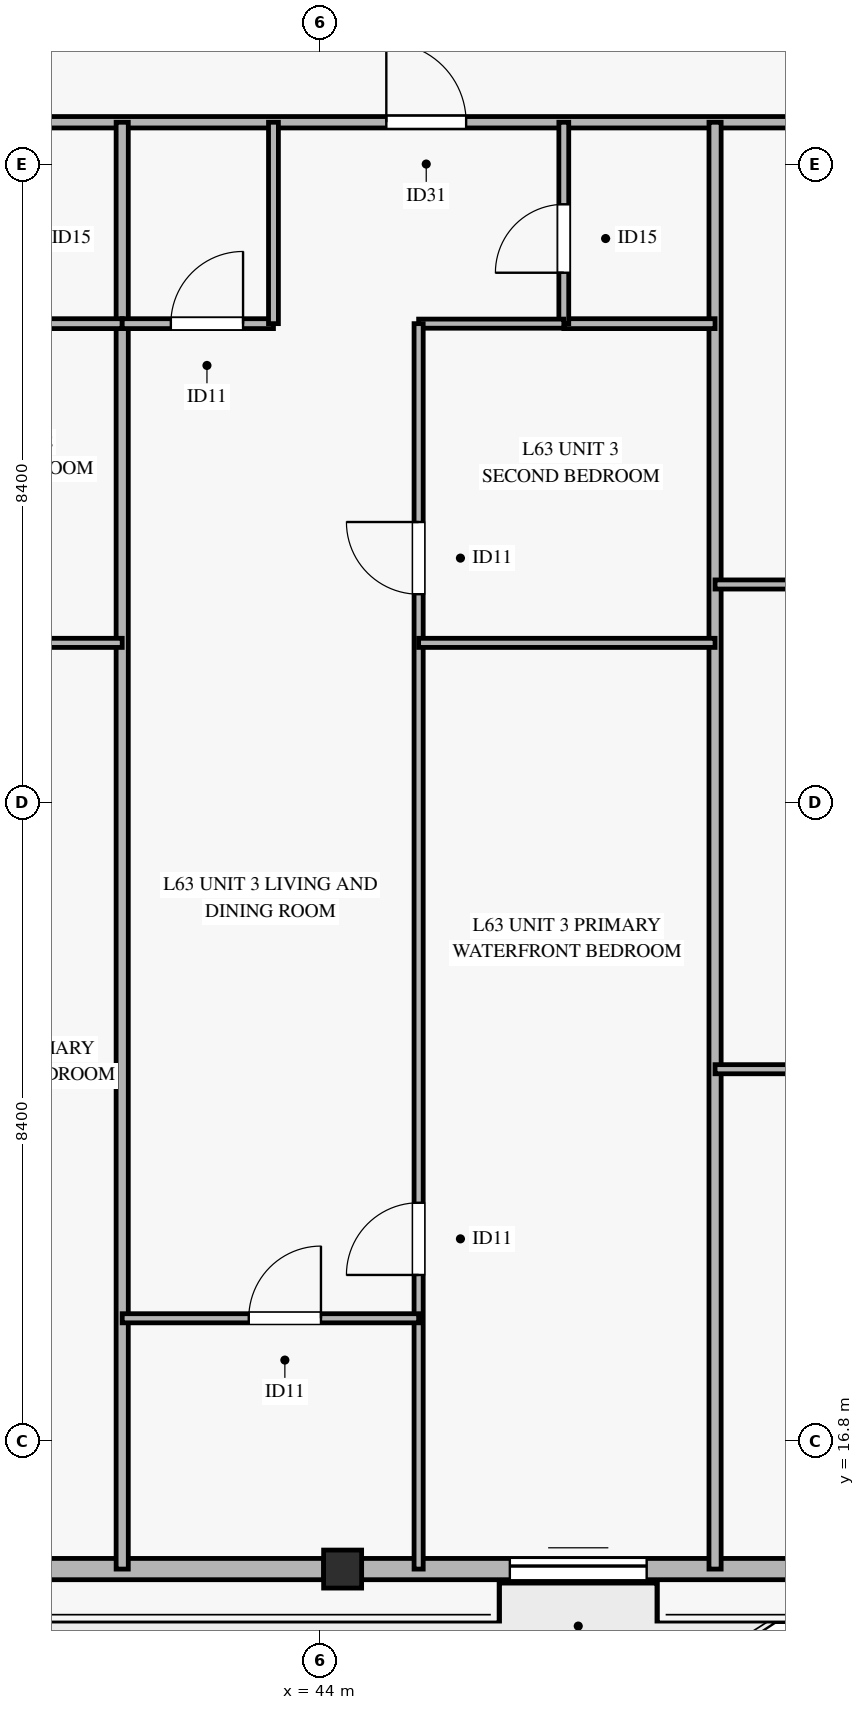
"""IFC4 building model, lengths in metres.
Left out: names, types, materials, properties, quantities, classifications, styles, units other than length and angle.
Written with IfcOpenShell. Run it as: python <this file> out.ifc"""

import sys

from ifc_helpers import new_model, si_unit, direction, frame, frame_2d, origin, origin_2d, place, context, subcontext, project, spatial, rectangle, hollow_rectangle, extrude, source, transform, mapped, element, fill, save


model = new_model("IFC4")
c1 = context("Model", 3, precision=1e-05, world=origin(), true_north=direction((0.0, 1.0)))
c2 = subcontext(c1, "Body", "Model", "MODEL_VIEW")
j1 = project(units=[si_unit("LENGTHUNIT", "METRE"), si_unit("PLANEANGLEUNIT", "RADIAN")], contexts=[c1])
p1 = place(None, origin())
s1 = spatial("IfcSite", under=j1, at=p1, CompositionType="ELEMENT")
p2 = place(p1, origin())
s2 = spatial("IfcBuilding", under=s1, at=p2, CompositionType="ELEMENT")
p3 = place(p2, frame((0.0, 0.0, 248.5)))
s3 = spatial("IfcBuildingStorey", under=s2, at=p3, CompositionType="ELEMENT", Elevation=248.5)
m1 = source(origin(), c2, "Body", "SweptSolid", [
    extrude(hollow_rectangle(XDim=0.5, YDim=0.5, WallThickness=0.024, at=origin_2d()), origin(), (0.0, 0.0, 1.0), 3.185),
])
p4 = place(p3, frame((44.3, 15.113, 0.0), z_axis=(0.0, 0.0, 1.0), x_axis=(1.0, 0.0, 0.0)))
e1 = element("IfcColumn", 1, at=p4, inside=s3, PredefinedType="COLUMN", context=c2, shape_type="MappedRepresentation", body=[
    mapped(m1, transform((0.0, 0.0, 0.0), x_axis=(1.0, 0.0, 0.0), y_axis=(0.0, 1.0, 0.0), z_axis=(0.0, 0.0, 1.0), scale=1.0)),
])
p5 = place(p3, frame((37.8, 15.113, 0.0), z_axis=(0.0, 0.0, 1.0), x_axis=(1.0, 0.0, 0.0)))
e2 = element("IfcWall", 2, at=p5, inside=s3, PredefinedType="SOLIDWALL", context=c2, shape_type="SweptSolid", body=[
    extrude(rectangle(XDim=6.25, YDim=0.28, at=frame_2d((3.125, 0.0))), origin(), (0.0, 0.0, 1.0), 2.815),
])
p6 = place(p3, frame((44.55, 15.113, 0.0), z_axis=(0.0, 0.0, 1.0), x_axis=(1.0, 0.0, 0.0)))
e3 = element("IfcWall", 3, at=p6, inside=s3, PredefinedType="SOLIDWALL", context=c2, shape_type="SweptSolid", body=[
    extrude(rectangle(XDim=5.75, YDim=0.28, at=frame_2d((2.875, 0.0))), origin(), (0.0, 0.0, 1.0), 2.815),
])
p7 = place(p6, frame((1.95, 0.0, 0.0)))
e4 = element("IfcOpeningElement", 4, at=p7, cuts=e3, PredefinedType="OPENING", context=c2, shape_type="SweptSolid", body=[
    extrude(rectangle(XDim=1.8, YDim=2.25, at=frame_2d((0.9, 1.125))), frame((0.0, 0.15, 0.0), z_axis=(0.0, -1.0, 0.0), x_axis=(1.0, 0.0, 0.0)), (0.0, 0.0, 1.0), 0.3),
])
p8 = place(p3, frame((8.364, 34.15, 0.0), z_axis=(0.0, 0.0, 1.0), x_axis=(1.0, 0.0, 0.0)))
e5 = element("IfcWall", 5, at=p8, inside=s3, PredefinedType="PARTITIONING", context=c2, shape_type="SweptSolid", body=[
    extrude(rectangle(XDim=53.673, YDim=0.15, at=frame_2d((26.836, 0.0))), origin(), (0.0, 0.0, 1.0), 2.47),
])
p9 = place(p8, frame((5.627, 0.0, 0.0)))
e6 = element("IfcOpeningElement", 6, at=p9, cuts=e5, PredefinedType="OPENING", context=c2, shape_type="SweptSolid", body=[
    extrude(rectangle(XDim=1.05, YDim=2.15, at=frame_2d((0.525, 1.075))), frame((0.0, 0.085, 0.0), z_axis=(0.0, -1.0, 0.0), x_axis=(1.0, 0.0, 0.0)), (0.0, 0.0, 1.0), 0.17),
])
p10 = place(p8, frame((16.561, 0.0, 0.0)))
e7 = element("IfcOpeningElement", 7, at=p10, cuts=e5, PredefinedType="OPENING", context=c2, shape_type="SweptSolid", body=[
    extrude(rectangle(XDim=1.05, YDim=2.15, at=frame_2d((0.525, 1.075))), frame((0.0, 0.085, 0.0), z_axis=(0.0, -1.0, 0.0), x_axis=(1.0, 0.0, 0.0)), (0.0, 0.0, 1.0), 0.17),
])
p11 = place(p8, frame((23.011, 0.0, 0.0)))
e8 = element("IfcOpeningElement", 8, at=p11, cuts=e5, PredefinedType="OPENING", context=c2, shape_type="SweptSolid", body=[
    extrude(rectangle(XDim=1.05, YDim=2.15, at=frame_2d((0.525, 1.075))), frame((0.0, 0.085, 0.0), z_axis=(0.0, -1.0, 0.0), x_axis=(1.0, 0.0, 0.0)), (0.0, 0.0, 1.0), 0.17),
])
p12 = place(p8, frame((29.411, 0.0, 0.0)))
e9 = element("IfcOpeningElement", 9, at=p12, cuts=e5, PredefinedType="OPENING", context=c2, shape_type="SweptSolid", body=[
    extrude(rectangle(XDim=1.05, YDim=2.15, at=frame_2d((0.525, 1.075))), frame((0.0, 0.085, 0.0), z_axis=(0.0, -1.0, 0.0), x_axis=(1.0, 0.0, 0.0)), (0.0, 0.0, 1.0), 0.17),
])
p13 = place(p8, frame((36.511, 0.0, 0.0)))
e10 = element("IfcOpeningElement", 10, at=p13, cuts=e5, PredefinedType="OPENING", context=c2, shape_type="SweptSolid", body=[
    extrude(rectangle(XDim=1.05, YDim=2.15, at=frame_2d((0.525, 1.075))), frame((0.0, 0.085, 0.0), z_axis=(0.0, -1.0, 0.0), x_axis=(1.0, 0.0, 0.0)), (0.0, 0.0, 1.0), 0.17),
])
p14 = place(p8, frame((45.807, 0.0, 0.0)))
e11 = element("IfcOpeningElement", 11, at=p14, cuts=e5, PredefinedType="OPENING", context=c2, shape_type="SweptSolid", body=[
    extrude(rectangle(XDim=1.05, YDim=2.15, at=frame_2d((0.525, 1.075))), frame((0.0, 0.085, 0.0), z_axis=(0.0, -1.0, 0.0), x_axis=(1.0, 0.0, 0.0)), (0.0, 0.0, 1.0), 0.17),
])
for number, where, z_axis, x_axis in (
    (12, (41.4, 15.113, 0.0), (0.0, 0.0, 1.0), (0.0, 1.0, 0.0)),
    (13, (49.2, 15.113, 0.0), (0.0, 0.0, 1.0), (0.0, 1.0, 0.0)),
):
    element("IfcWall", number, at=place(p3, frame(where, z_axis=z_axis, x_axis=x_axis)), inside=s3, PredefinedType="PARTITIONING", context=c2, shape_type="SweptSolid", body=[
        extrude(rectangle(XDim=19.037, YDim=0.16, at=frame_2d((9.519, 0.0))), origin(), (0.0, 0.0, 1.0), 2.77),
    ])
p15 = place(p3, frame((39.76, 31.5, 0.0), z_axis=(0.0, 0.0, 1.0), x_axis=(1.0, 0.0, 0.0)))
e14 = element("IfcWall", 14, at=p15, inside=s3, PredefinedType="PARTITIONING", context=c2, shape_type="SweptSolid", body=[
    extrude(rectangle(XDim=1.64, YDim=0.13, at=frame_2d((0.82, 0.0))), origin(), (0.0, 0.0, 1.0), 3.185),
])
p16 = place(p3, frame((38.2, 27.3, 0.0), z_axis=(0.0, 0.0, 1.0), x_axis=(1.0, 0.0, 0.0)))
e15 = element("IfcWall", 15, at=p16, inside=s3, PredefinedType="PARTITIONING", context=c2, shape_type="SweptSolid", body=[
    extrude(rectangle(XDim=3.2, YDim=0.12, at=frame_2d((1.6, 0.0))), origin(), (0.0, 0.0, 1.0), 3.185),
])
p17 = place(p3, frame((41.4, 31.5, 0.0), z_axis=(0.0, 0.0, 1.0), x_axis=(1.0, 0.0, 0.0)))
e16 = element("IfcWall", 16, at=p17, inside=s3, PredefinedType="PARTITIONING", context=c2, shape_type="SweptSolid", body=[
    extrude(rectangle(XDim=1.99, YDim=0.13, at=frame_2d((0.995, 0.0))), origin(), (0.0, 0.0, 1.0), 3.185),
])
p18 = place(p17, frame((0.64, 0.0, 0.0)))
e17 = element("IfcOpeningElement", 17, at=p18, cuts=e16, PredefinedType="OPENING", context=c2, shape_type="SweptSolid", body=[
    extrude(rectangle(XDim=0.95, YDim=2.1, at=frame_2d((0.475, 1.05))), frame((0.0, 0.075, 0.0), z_axis=(0.0, -1.0, 0.0), x_axis=(1.0, 0.0, 0.0)), (0.0, 0.0, 1.0), 0.15),
])
p19 = place(p3, frame((43.39, 31.5, 0.0), z_axis=(0.0, 0.0, 1.0), x_axis=(0.0, 1.0, 0.0)))
e18 = element("IfcWall", 18, at=p19, inside=s3, PredefinedType="PARTITIONING", context=c2, shape_type="SweptSolid", body=[
    extrude(rectangle(XDim=2.65, YDim=0.13, at=frame_2d((1.325, 0.0))), origin(), (0.0, 0.0, 1.0), 2.77),
])
p20 = place(p3, frame((47.21, 31.5, 0.0), z_axis=(0.0, 0.0, 1.0), x_axis=(1.0, 0.0, 0.0)))
e19 = element("IfcWall", 19, at=p20, inside=s3, PredefinedType="PARTITIONING", context=c2, shape_type="SweptSolid", body=[
    extrude(rectangle(XDim=1.99, YDim=0.13, at=frame_2d((0.995, 0.0))), origin(), (0.0, 0.0, 1.0), 3.185),
])
p21 = place(p3, frame((47.21, 31.5, 0.0), z_axis=(0.0, 0.0, 1.0), x_axis=(0.0, 1.0, 0.0)))
e20 = element("IfcWall", 20, at=p21, inside=s3, PredefinedType="PARTITIONING", context=c2, shape_type="SweptSolid", body=[
    extrude(rectangle(XDim=2.65, YDim=0.13, at=frame_2d((1.325, 0.0))), origin(), (0.0, 0.0, 1.0), 2.77),
])
p22 = place(p21, frame((0.67, 0.0, 0.0)))
e21 = element("IfcOpeningElement", 21, at=p22, cuts=e20, PredefinedType="OPENING", context=c2, shape_type="SweptSolid", body=[
    extrude(rectangle(XDim=0.9, YDim=2.1, at=frame_2d((0.45, 1.05))), frame((0.0, 0.075, 0.0), z_axis=(0.0, -1.0, 0.0), x_axis=(1.0, 0.0, 0.0)), (0.0, 0.0, 1.0), 0.15),
])
p23 = place(p3, frame((45.3, 31.5, 0.0), z_axis=(0.0, 0.0, 1.0), x_axis=(1.0, 0.0, 0.0)))
e22 = element("IfcWall", 22, at=p23, inside=s3, PredefinedType="PARTITIONING", context=c2, shape_type="SweptSolid", body=[
    extrude(rectangle(XDim=1.91, YDim=0.12, at=frame_2d((0.955, 0.0))), origin(), (0.0, 0.0, 1.0), 3.185),
])
p24 = place(p3, frame((45.3, 15.113, 0.0), z_axis=(0.0, 0.0, 1.0), x_axis=(0.0, 1.0, 0.0)))
e23 = element("IfcWall", 23, at=p24, inside=s3, PredefinedType="PARTITIONING", context=c2, shape_type="SweptSolid", body=[
    extrude(rectangle(XDim=16.387, YDim=0.12, at=frame_2d((8.193, 0.0))), origin(), (0.0, 0.0, 1.0), 2.77),
])
p25 = place(p24, frame((3.87, 0.0, 0.0)))
e24 = element("IfcOpeningElement", 24, at=p25, cuts=e23, PredefinedType="OPENING", context=c2, shape_type="SweptSolid", body=[
    extrude(rectangle(XDim=0.95, YDim=2.1, at=frame_2d((0.475, 1.05))), frame((0.0, 0.07, 0.0), z_axis=(0.0, -1.0, 0.0), x_axis=(1.0, 0.0, 0.0)), (0.0, 0.0, 1.0), 0.14),
])
p26 = place(p24, frame((12.827, 0.0, 0.0)))
e25 = element("IfcOpeningElement", 25, at=p26, cuts=e23, PredefinedType="OPENING", context=c2, shape_type="SweptSolid", body=[
    extrude(rectangle(XDim=0.95, YDim=2.1, at=frame_2d((0.475, 1.05))), frame((0.0, 0.07, 0.0), z_axis=(0.0, -1.0, 0.0), x_axis=(1.0, 0.0, 0.0)), (0.0, 0.0, 1.0), 0.14),
])
p27 = place(p3, frame((41.4, 18.413, 0.0), z_axis=(0.0, 0.0, 1.0), x_axis=(1.0, 0.0, 0.0)))
e26 = element("IfcWall", 26, at=p27, inside=s3, PredefinedType="PARTITIONING", context=c2, shape_type="SweptSolid", body=[
    extrude(rectangle(XDim=3.9, YDim=0.12, at=frame_2d((1.95, 0.0))), origin(), (0.0, 0.0, 1.0), 2.47),
])
p28 = place(p27, frame((1.665, 0.0, 0.0)))
e27 = element("IfcOpeningElement", 27, at=p28, cuts=e26, PredefinedType="OPENING", context=c2, shape_type="SweptSolid", body=[
    extrude(rectangle(XDim=0.95, YDim=2.1, at=frame_2d((0.475, 1.05))), frame((0.0, 0.07, 0.0), z_axis=(0.0, -1.0, 0.0), x_axis=(1.0, 0.0, 0.0)), (0.0, 0.0, 1.0), 0.14),
])
p29 = place(p3, frame((45.3, 27.3, 0.0), z_axis=(0.0, 0.0, 1.0), x_axis=(1.0, 0.0, 0.0)))
e28 = element("IfcWall", 28, at=p29, inside=s3, PredefinedType="PARTITIONING", context=c2, shape_type="SweptSolid", body=[
    extrude(rectangle(XDim=3.9, YDim=0.12, at=frame_2d((1.95, 0.0))), origin(), (0.0, 0.0, 1.0), 3.185),
])
p30 = place(p3, frame((49.2, 21.69, 0.0), z_axis=(0.0, 0.0, 1.0), x_axis=(1.0, 0.0, 0.0)))
e29 = element("IfcWall", 29, at=p30, inside=s3, PredefinedType="PARTITIONING", context=c2, shape_type="SweptSolid", body=[
    extrude(rectangle(XDim=12.837, YDim=0.12, at=frame_2d((6.418, 0.0))), origin(), (0.0, 0.0, 1.0), 2.47),
])
p31 = place(p30, frame((5.221, 0.0, 0.0)))
e30 = element("IfcOpeningElement", 30, at=p31, cuts=e29, PredefinedType="OPENING", context=c2, shape_type="SweptSolid", body=[
    extrude(rectangle(XDim=0.95, YDim=2.1, at=frame_2d((0.475, 1.05))), frame((0.0, 0.07, 0.0), z_axis=(0.0, -1.0, 0.0), x_axis=(1.0, 0.0, 0.0)), (0.0, 0.0, 1.0), 0.14),
])
p32 = place(p3, frame((49.2, 28.068, 0.0), z_axis=(0.0, 0.0, 1.0), x_axis=(1.0, 0.0, 0.0)))
e31 = element("IfcWall", 31, at=p32, inside=s3, PredefinedType="PARTITIONING", context=c2, shape_type="SweptSolid", body=[
    extrude(rectangle(XDim=12.837, YDim=0.12, at=frame_2d((6.418, 0.0))), origin(), (0.0, 0.0, 1.0), 2.47),
])
p33 = place(p32, frame((5.221, 0.0, 0.0)))
e32 = element("IfcOpeningElement", 32, at=p33, cuts=e31, PredefinedType="OPENING", context=c2, shape_type="SweptSolid", body=[
    extrude(rectangle(XDim=0.95, YDim=2.1, at=frame_2d((0.475, 1.05))), frame((0.0, 0.07, 0.0), z_axis=(0.0, -1.0, 0.0), x_axis=(1.0, 0.0, 0.0)), (0.0, 0.0, 1.0), 0.14),
])
m2 = source(origin(), c2, "Body", "SweptSolid", [
    extrude(rectangle(XDim=1.8, YDim=2.25, at=frame_2d((0.9, 1.125))), frame((0.0, 0.025, 0.0), z_axis=(0.0, -1.0, 0.0), x_axis=(1.0, 0.0, 0.0)), (0.0, 0.0, 1.0), 0.05),
])
p34 = place(p7, origin())
e33 = element("IfcDoor", 33, at=p34, inside=s3, OperationType="SLIDING_TO_LEFT", PredefinedType="DOOR", context=c2, shape_type="MappedRepresentation", body=[
    mapped(m2, transform((0.0, 0.0, 0.0), x_axis=(1.0, 0.0, 0.0), y_axis=(0.0, 1.0, 0.0), z_axis=(0.0, 0.0, 1.0), scale=1.0)),
])
fill(e4, e33)
m3 = source(origin(), c2, "Body", "SweptSolid", [
    extrude(rectangle(XDim=1.05, YDim=2.15, at=frame_2d((0.525, 1.075))), frame((0.0, 0.025, 0.0), z_axis=(0.0, -1.0, 0.0), x_axis=(1.0, 0.0, 0.0)), (0.0, 0.0, 1.0), 0.05),
])
p35 = place(p13, origin())
e34 = element("IfcDoor", 34, at=p35, inside=s3, OperationType="SINGLE_SWING_LEFT", PredefinedType="DOOR", context=c2, shape_type="MappedRepresentation", body=[
    mapped(m3, transform((0.0, 0.0, 0.0), x_axis=(1.0, 0.0, 0.0), y_axis=(0.0, 1.0, 0.0), z_axis=(0.0, 0.0, 1.0), scale=1.0)),
])
fill(e10, e34)
m4 = source(origin(), c2, "Body", "SweptSolid", [
    extrude(rectangle(XDim=0.95, YDim=2.1, at=frame_2d((0.475, 1.05))), frame((0.0, 0.025, 0.0), z_axis=(0.0, -1.0, 0.0), x_axis=(1.0, 0.0, 0.0)), (0.0, 0.0, 1.0), 0.05),
])
p36 = place(p18, origin())
e35 = element("IfcDoor", 35, at=p36, inside=s3, OperationType="SINGLE_SWING_RIGHT", PredefinedType="DOOR", context=c2, shape_type="MappedRepresentation", body=[
    mapped(m4, transform((0.0, 0.0, 0.0), x_axis=(1.0, 0.0, 0.0), y_axis=(0.0, 1.0, 0.0), z_axis=(0.0, 0.0, 1.0), scale=1.0)),
])
fill(e17, e35)
m5 = source(origin(), c2, "Body", "SweptSolid", [
    extrude(rectangle(XDim=0.9, YDim=2.1, at=frame_2d((0.45, 1.05))), frame((0.0, 0.025, 0.0), z_axis=(0.0, -1.0, 0.0), x_axis=(1.0, 0.0, 0.0)), (0.0, 0.0, 1.0), 0.05),
])
p37 = place(p22, origin())
e36 = element("IfcDoor", 36, at=p37, inside=s3, OperationType="SINGLE_SWING_LEFT", PredefinedType="DOOR", context=c2, shape_type="MappedRepresentation", body=[
    mapped(m5, transform((0.0, 0.0, 0.0), x_axis=(1.0, 0.0, 0.0), y_axis=(0.0, 1.0, 0.0), z_axis=(0.0, 0.0, 1.0), scale=1.0)),
])
fill(e21, e36)
p38 = place(p28, origin())
e37 = element("IfcDoor", 37, at=p38, inside=s3, OperationType="SINGLE_SWING_RIGHT", PredefinedType="DOOR", context=c2, shape_type="MappedRepresentation", body=[
    mapped(m4, transform((0.0, 0.0, 0.0), x_axis=(1.0, 0.0, 0.0), y_axis=(0.0, 1.0, 0.0), z_axis=(0.0, 0.0, 1.0), scale=1.0)),
])
fill(e27, e37)
p39 = place(p25, origin())
e38 = element("IfcDoor", 38, at=p39, inside=s3, OperationType="SINGLE_SWING_LEFT", PredefinedType="DOOR", context=c2, shape_type="MappedRepresentation", body=[
    mapped(m4, transform((0.0, 0.0, 0.0), x_axis=(1.0, 0.0, 0.0), y_axis=(0.0, 1.0, 0.0), z_axis=(0.0, 0.0, 1.0), scale=1.0)),
])
fill(e24, e38)
p40 = place(p26, origin())
e39 = element("IfcDoor", 39, at=p40, inside=s3, OperationType="SINGLE_SWING_RIGHT", PredefinedType="DOOR", context=c2, shape_type="MappedRepresentation", body=[
    mapped(m4, transform((0.0, 0.0, 0.0), x_axis=(1.0, 0.0, 0.0), y_axis=(0.0, 1.0, 0.0), z_axis=(0.0, 0.0, 1.0), scale=1.0)),
])
fill(e25, e39)
save(model, sys.argv[1])
